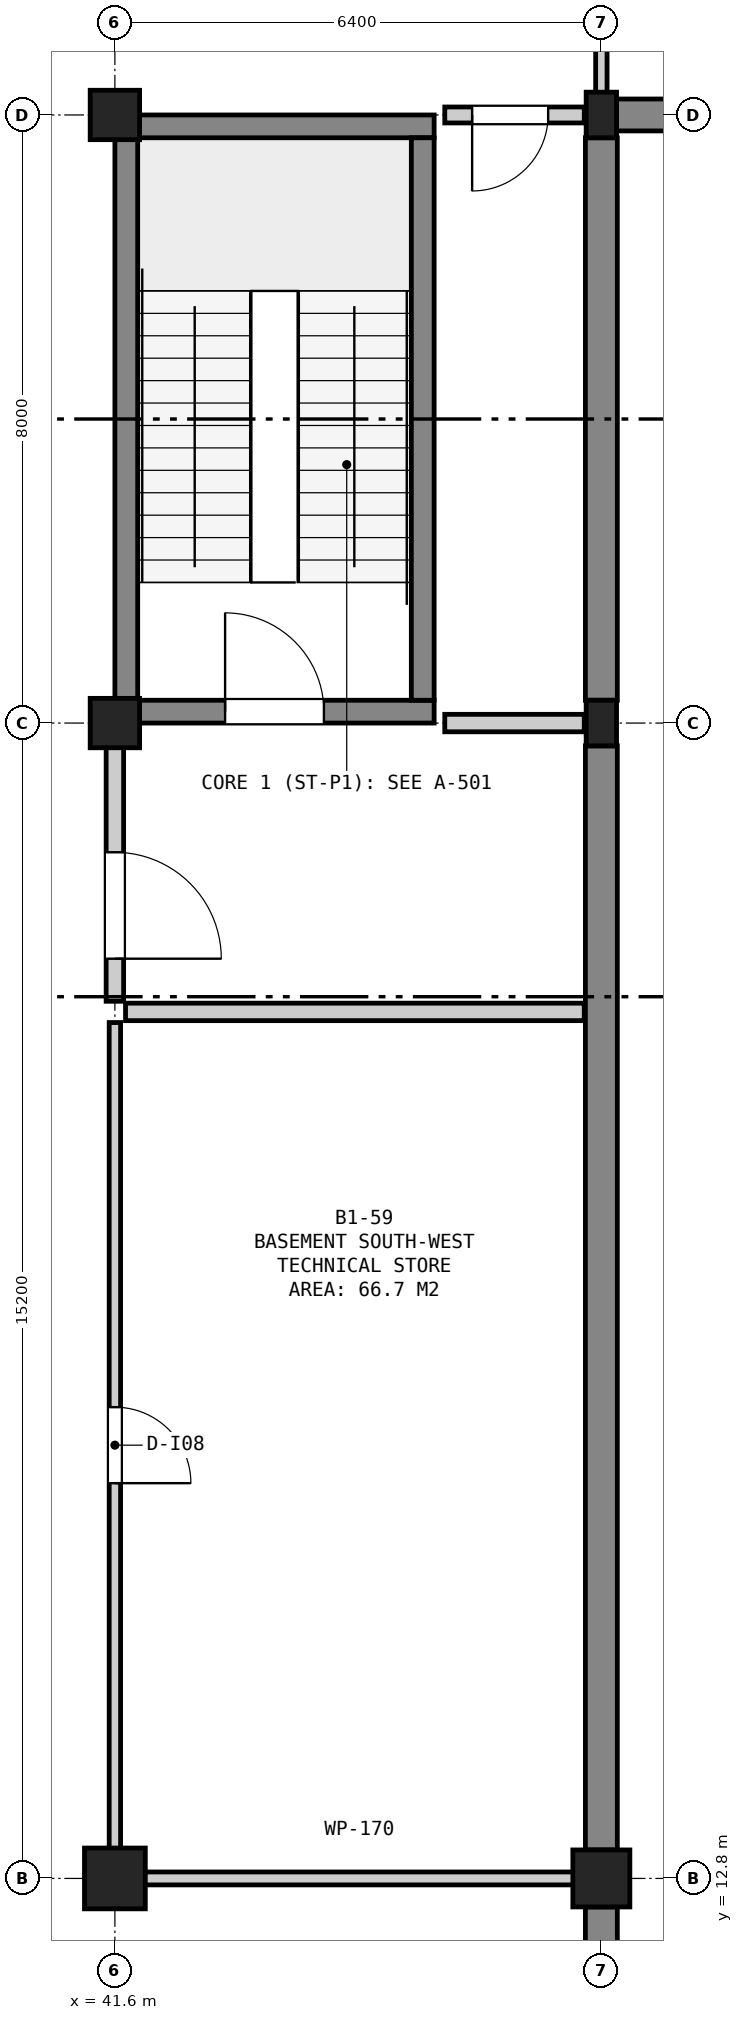
"""IFC4 building model, lengths in metres.
Left out: names, types, materials, properties, quantities, classifications, styles, units other than length and angle.
Written with IfcOpenShell. Run it as: python <this file> out.ifc"""

import sys

from ifc_helpers import new_model, si_unit, direction, frame, frame_2d, origin, origin_2d, place, context, subcontext, project, spatial, rectangle, extrude, element, fill, save


model = new_model("IFC4")
c1 = context("Model", 3, precision=1e-05, world=origin(), true_north=direction((0.0, 1.0)))
c2 = subcontext(c1, "Body", "Model", "MODEL_VIEW")
j1 = project(units=[si_unit("LENGTHUNIT", "METRE"), si_unit("PLANEANGLEUNIT", "RADIAN")], contexts=[c1])
p1 = place(None, origin())
s1 = spatial("IfcSite", under=j1, at=p1, CompositionType="ELEMENT")
p2 = place(p1, origin())
s2 = spatial("IfcBuilding", under=s1, at=p2, CompositionType="ELEMENT")
p3 = place(p2, frame((0.0, 0.0, -4.5)))
s3 = spatial("IfcBuildingStorey", under=s2, at=p3, CompositionType="ELEMENT", Elevation=-4.5)
p4 = place(p3, frame((41.6, 12.8, 0.0), z_axis=(0.0, 0.0, 1.0), x_axis=(1.0, 0.0, 0.0)))
e1 = element("IfcColumn", 1, at=p4, inside=s3, PredefinedType="COLUMN", context=c2, shape_type="SweptSolid", body=[
    extrude(rectangle(XDim=0.8, YDim=0.8, at=origin_2d()), origin(), (0.0, 0.0, 1.0), 4.5),
])
for number, where, z_axis, x_axis in (
    (2, (41.6, 28.0, 0.0), (0.0, 0.0, 1.0), (1.0, 0.0, 0.0)),
    (3, (41.6, 36.0, 0.0), (0.0, 0.0, 1.0), (1.0, 0.0, 0.0)),
):
    element("IfcColumn", number, at=place(p3, frame(where, z_axis=z_axis, x_axis=x_axis)), inside=s3, PredefinedType="COLUMN", context=c2, shape_type="SweptSolid", body=[
        extrude(rectangle(XDim=0.65, YDim=0.65, at=origin_2d()), origin(), (0.0, 0.0, 1.0), 4.5),
    ])
p5 = place(p3, frame((48.0, 12.8, 0.0), z_axis=(0.0, 0.0, 1.0), x_axis=(1.0, 0.0, 0.0)))
e4 = element("IfcColumn", 4, at=p5, inside=s3, PredefinedType="COLUMN", context=c2, shape_type="SweptSolid", body=[
    extrude(rectangle(XDim=0.75, YDim=0.75, at=origin_2d()), origin(), (0.0, 0.0, 1.0), 4.5),
])
for number, where, z_axis, x_axis in (
    (5, (48.0, 28.0, 0.0), (0.0, 0.0, 1.0), (1.0, 0.0, 0.0)),
    (6, (48.0, 36.0, 0.0), (0.0, 0.0, 1.0), (1.0, 0.0, 0.0)),
):
    element("IfcColumn", number, at=place(p3, frame(where, z_axis=z_axis, x_axis=x_axis)), inside=s3, PredefinedType="COLUMN", context=c2, shape_type="SweptSolid", body=[
        extrude(rectangle(XDim=0.4, YDim=0.6, at=origin_2d()), origin(), (0.0, 0.0, 1.0), 4.5),
    ])
p6 = place(p3, frame((48.0, 0.425, 0.0), z_axis=(0.0, 0.0, 1.0), x_axis=(0.0, 1.0, 0.0)))
e7 = element("IfcWall", 7, at=p6, inside=s3, PredefinedType="SOLIDWALL", context=c2, shape_type="SweptSolid", body=[
    extrude(rectangle(XDim=12.0, YDim=0.42, at=frame_2d((6.0, 0.0))), origin(), (0.0, 0.0, 1.0), 4.08),
])
p7 = place(p3, frame((48.0, 13.175, 0.0), z_axis=(0.0, 0.0, 1.0), x_axis=(0.0, 1.0, 0.0)))
e8 = element("IfcWall", 8, at=p7, inside=s3, PredefinedType="SOLIDWALL", context=c2, shape_type="SweptSolid", body=[
    extrude(rectangle(XDim=14.525, YDim=0.42, at=frame_2d((7.262, 0.0))), origin(), (0.0, 0.0, 1.0), 4.08),
])
p8 = place(p3, frame((48.0, 28.3, 0.0), z_axis=(0.0, 0.0, 1.0), x_axis=(0.0, 1.0, 0.0)))
e9 = element("IfcWall", 9, at=p8, inside=s3, PredefinedType="SOLIDWALL", context=c2, shape_type="SweptSolid", body=[
    extrude(rectangle(XDim=7.4, YDim=0.42, at=frame_2d((3.7, 0.0))), origin(), (0.0, 0.0, 1.0), 4.08),
])
p9 = place(p3, frame((48.2, 36.0, 0.0), z_axis=(0.0, 0.0, 1.0), x_axis=(1.0, 0.0, 0.0)))
e10 = element("IfcWall", 10, at=p9, inside=s3, PredefinedType="SOLIDWALL", context=c2, shape_type="SweptSolid", body=[
    extrude(rectangle(XDim=6.0, YDim=0.42, at=frame_2d((3.0, 0.0))), origin(), (0.0, 0.0, 1.0), 4.08),
])
p10 = place(p3, frame((41.6, 28.15, 0.0), z_axis=(0.0, 0.0, 1.0), x_axis=(1.0, 0.0, 0.0)))
e11 = element("IfcWall", 11, at=p10, inside=s3, PredefinedType="SHEAR", context=c2, shape_type="SweptSolid", body=[
    extrude(rectangle(XDim=4.2, YDim=0.3, at=frame_2d((2.1, 0.0))), origin(), (0.0, 0.0, 1.0), 4.08),
])
p11 = place(p10, frame((1.45, 0.0, 0.0)))
e12 = element("IfcOpeningElement", 12, at=p11, cuts=e11, PredefinedType="OPENING", context=c2, shape_type="SweptSolid", body=[
    extrude(rectangle(XDim=1.3, YDim=2.18, at=frame_2d((0.65, 1.09))), frame((0.0, 0.162, 0.0), z_axis=(0.0, -1.0, 0.0), x_axis=(1.0, 0.0, 0.0)), (0.0, 0.0, 1.0), 0.324),
])
p12 = place(p3, frame((41.6, 35.85, 0.0), z_axis=(0.0, 0.0, 1.0), x_axis=(1.0, 0.0, 0.0)))
e13 = element("IfcWall", 13, at=p12, inside=s3, PredefinedType="SHEAR", context=c2, shape_type="SweptSolid", body=[
    extrude(rectangle(XDim=4.2, YDim=0.3, at=frame_2d((2.1, 0.0))), origin(), (0.0, 0.0, 1.0), 4.08),
])
for number, where, z_axis, x_axis in (
    (14, (41.75, 28.3, 0.0), (0.0, 0.0, 1.0), (0.0, 1.0, 0.0)),
    (15, (45.65, 28.3, 0.0), (0.0, 0.0, 1.0), (0.0, 1.0, 0.0)),
):
    element("IfcWall", number, at=place(p3, frame(where, z_axis=z_axis, x_axis=x_axis)), inside=s3, PredefinedType="SHEAR", context=c2, shape_type="SweptSolid", body=[
        extrude(rectangle(XDim=7.4, YDim=0.3, at=frame_2d((3.7, 0.0))), origin(), (0.0, 0.0, 1.0), 4.08),
    ])
p13 = place(p3, frame((41.74, 24.2, 0.0), z_axis=(0.0, 0.0, 1.0), x_axis=(1.0, 0.0, 0.0)))
e16 = element("IfcWall", 16, at=p13, inside=s3, PredefinedType="SOLIDWALL", context=c2, shape_type="SweptSolid", body=[
    extrude(rectangle(XDim=6.035, YDim=0.23, at=frame_2d((3.018, 0.0))), origin(), (0.0, 0.0, 1.0), 4.08),
])
p14 = place(p3, frame((45.94, 28.0, 0.0), z_axis=(0.0, 0.0, 1.0), x_axis=(1.0, 0.0, 0.0)))
e17 = element("IfcWall", 17, at=p14, inside=s3, PredefinedType="SOLIDWALL", context=c2, shape_type="SweptSolid", body=[
    extrude(rectangle(XDim=1.835, YDim=0.23, at=frame_2d((0.917, 0.0))), origin(), (0.0, 0.0, 1.0), 3.225),
])
p15 = place(p3, frame((41.6, 24.34, 0.0), z_axis=(0.0, 0.0, 1.0), x_axis=(0.0, 1.0, 0.0)))
e18 = element("IfcWall", 18, at=p15, inside=s3, PredefinedType="SOLIDWALL", context=c2, shape_type="SweptSolid", body=[
    extrude(rectangle(XDim=3.52, YDim=0.23, at=frame_2d((1.76, 0.0))), origin(), (0.0, 0.0, 1.0), 2.925),
])
p16 = place(p15, frame((0.56, 0.0, 0.0)))
e19 = element("IfcOpeningElement", 19, at=p16, cuts=e18, PredefinedType="OPENING", context=c2, shape_type="SweptSolid", body=[
    extrude(rectangle(XDim=1.4, YDim=2.2, at=frame_2d((0.7, 1.1))), frame((0.0, 0.127, 0.0), z_axis=(0.0, -1.0, 0.0), x_axis=(1.0, 0.0, 0.0)), (0.0, 0.0, 1.0), 0.254),
])
p17 = place(p3, frame((45.94, 36.0, 0.0), z_axis=(0.0, 0.0, 1.0), x_axis=(1.0, 0.0, 0.0)))
e20 = element("IfcWall", 20, at=p17, inside=s3, PredefinedType="SOLIDWALL", context=c2, shape_type="SweptSolid", body=[
    extrude(rectangle(XDim=1.835, YDim=0.21, at=frame_2d((0.917, 0.0))), origin(), (0.0, 0.0, 1.0), 3.625),
])
p18 = place(p17, frame((0.36, 0.0, 0.0)))
e21 = element("IfcOpeningElement", 21, at=p18, cuts=e20, PredefinedType="OPENING", context=c2, shape_type="SweptSolid", body=[
    extrude(rectangle(XDim=1.0, YDim=2.15, at=frame_2d((0.5, 1.075))), frame((0.0, 0.117, 0.0), z_axis=(0.0, -1.0, 0.0), x_axis=(1.0, 0.0, 0.0)), (0.0, 0.0, 1.0), 0.234),
])
p19 = place(p3, frame((41.74, 12.8, 0.0), z_axis=(0.0, 0.0, 1.0), x_axis=(1.0, 0.0, 0.0)))
e22 = element("IfcWall", 22, at=p19, inside=s3, PredefinedType="PARTITIONING", context=c2, shape_type="SweptSolid", body=[
    extrude(rectangle(XDim=6.155, YDim=0.17, at=frame_2d((3.078, 0.0))), origin(), (0.0, 0.0, 1.0), 3.275),
])
p20 = place(p3, frame((41.6, 12.94, 0.0), z_axis=(0.0, 0.0, 1.0), x_axis=(0.0, 1.0, 0.0)))
e23 = element("IfcWall", 23, at=p20, inside=s3, PredefinedType="PARTITIONING", context=c2, shape_type="SweptSolid", body=[
    extrude(rectangle(XDim=11.12, YDim=0.15, at=frame_2d((5.56, 0.0))), origin(), (0.0, 0.0, 1.0), 2.925),
])
p21 = place(p20, frame((5.06, 0.0, 0.0)))
e24 = element("IfcOpeningElement", 24, at=p21, cuts=e23, PredefinedType="OPENING", context=c2, shape_type="SweptSolid", body=[
    extrude(rectangle(XDim=1.0, YDim=2.15, at=frame_2d((0.5, 1.075))), frame((0.0, 0.087, 0.0), z_axis=(0.0, -1.0, 0.0), x_axis=(1.0, 0.0, 0.0)), (0.0, 0.0, 1.0), 0.174),
])
p22 = place(p3, frame((48.0, 36.225, 0.0), z_axis=(0.0, 0.0, 1.0), x_axis=(0.0, 1.0, 0.0)))
e25 = element("IfcWall", 25, at=p22, inside=s3, PredefinedType="PARTITIONING", context=c2, shape_type="SweptSolid", body=[
    extrude(rectangle(XDim=14.835, YDim=0.15, at=frame_2d((7.417, 0.0))), origin(), (0.0, 0.0, 1.0), 3.325),
])
p23 = place(p11, origin())
e26 = element("IfcDoor", 26, at=p23, inside=s3, OperationType="SINGLE_SWING_LEFT", PredefinedType="DOOR", context=c2, shape_type="SweptSolid", body=[
    extrude(rectangle(XDim=1.3, YDim=2.18, at=frame_2d((0.65, 1.09))), frame((0.0, 0.025, 0.0), z_axis=(0.0, -1.0, 0.0), x_axis=(1.0, 0.0, 0.0)), (0.0, 0.0, 1.0), 0.05),
])
fill(e12, e26)
p24 = place(p16, frame((1.4, 0.0, 0.0), z_axis=(0.0, 0.0, 1.0), x_axis=(-1.0, 0.0, 0.0)))
e27 = element("IfcDoor", 27, at=p24, inside=s3, OperationType="SINGLE_SWING_RIGHT", PredefinedType="DOOR", context=c2, shape_type="SweptSolid", body=[
    extrude(rectangle(XDim=1.4, YDim=2.2, at=frame_2d((0.7, 1.1))), frame((0.0, 0.025, 0.0), z_axis=(0.0, -1.0, 0.0), x_axis=(1.0, 0.0, 0.0)), (0.0, 0.0, 1.0), 0.05),
])
fill(e19, e27)
p25 = place(p18, frame((1.0, 0.0, 0.0), z_axis=(0.0, 0.0, 1.0), x_axis=(-1.0, 0.0, 0.0)))
e28 = element("IfcDoor", 28, at=p25, inside=s3, OperationType="SINGLE_SWING_RIGHT", PredefinedType="DOOR", context=c2, shape_type="SweptSolid", body=[
    extrude(rectangle(XDim=1.0, YDim=2.15, at=frame_2d((0.5, 1.075))), frame((0.0, 0.025, 0.0), z_axis=(0.0, -1.0, 0.0), x_axis=(1.0, 0.0, 0.0)), (0.0, 0.0, 1.0), 0.05),
])
fill(e21, e28)
p26 = place(p21, frame((1.0, 0.0, 0.0), z_axis=(0.0, 0.0, 1.0), x_axis=(-1.0, 0.0, 0.0)))
e29 = element("IfcDoor", 29, at=p26, inside=s3, OperationType="SINGLE_SWING_RIGHT", PredefinedType="DOOR", context=c2, shape_type="SweptSolid", body=[
    extrude(rectangle(XDim=1.0, YDim=2.15, at=frame_2d((0.5, 1.075))), frame((0.0, 0.025, 0.0), z_axis=(0.0, -1.0, 0.0), x_axis=(1.0, 0.0, 0.0)), (0.0, 0.0, 1.0), 0.05),
])
fill(e24, e29)
save(model, sys.argv[1])
